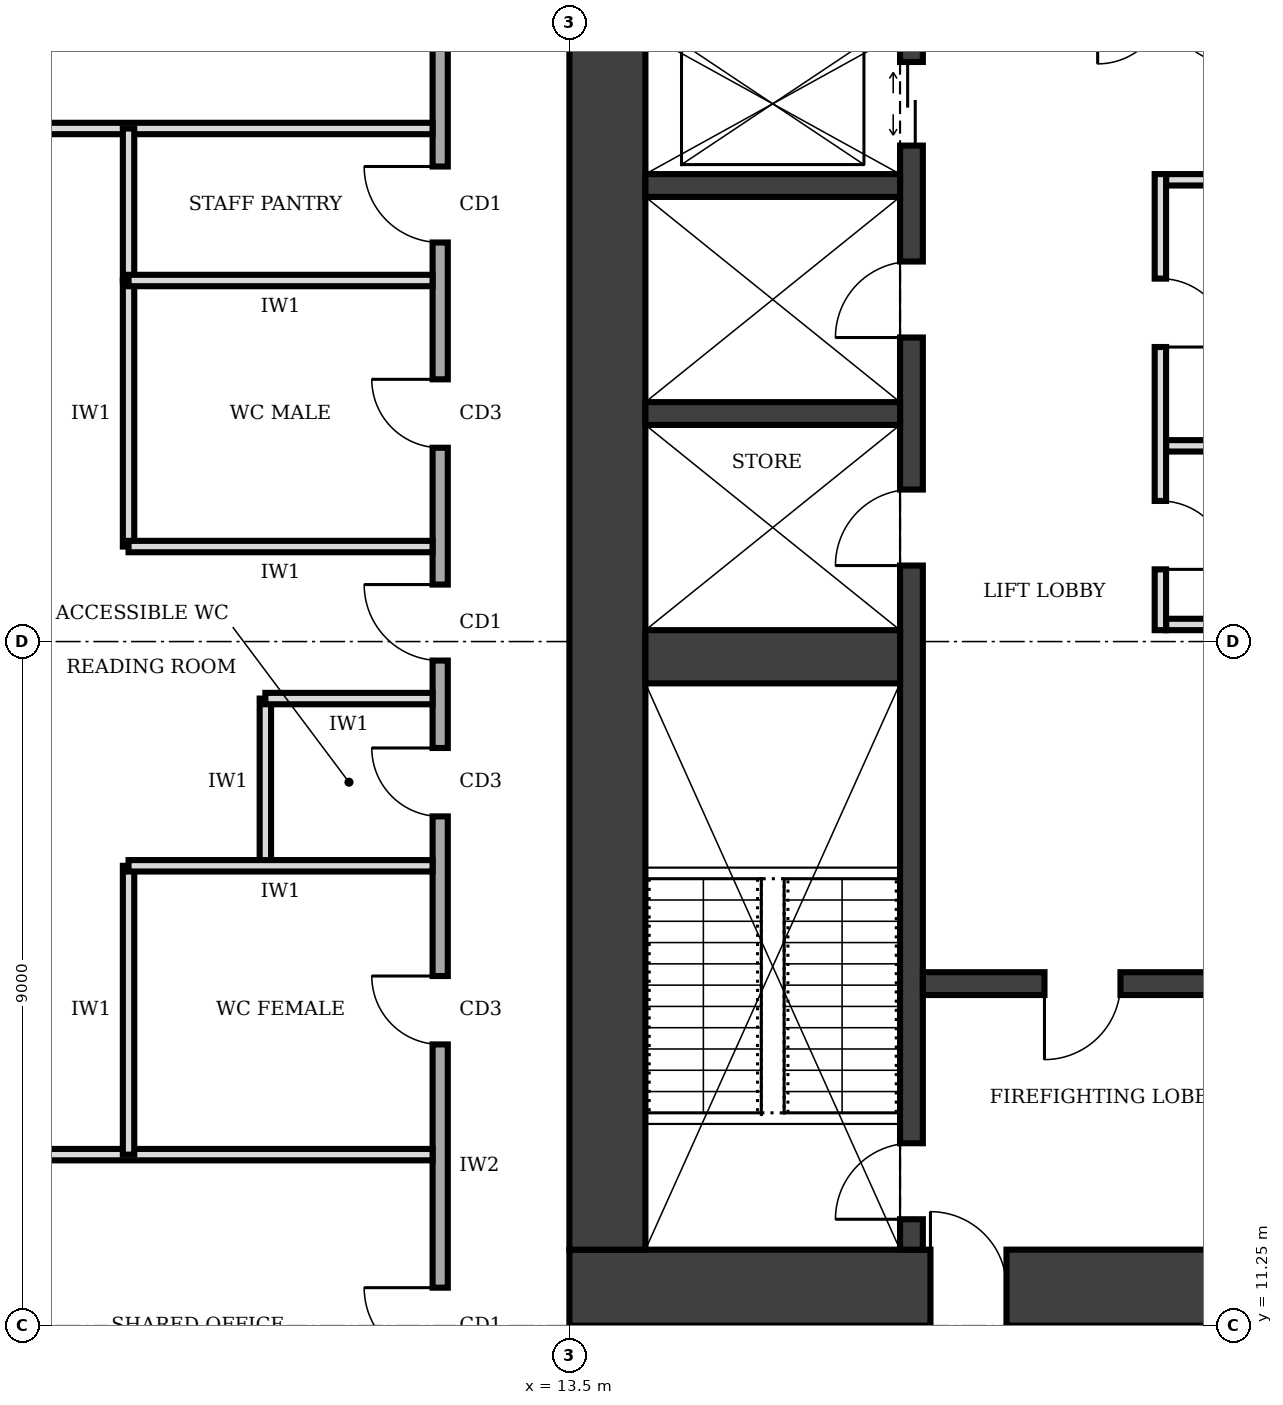
"""IFC4 building model, lengths in metres.
Left out: names, types, materials, properties, quantities, classifications, styles, units other than length and angle.
Written with IfcOpenShell. Run it as: python <this file> out.ifc"""

import sys

from ifc_helpers import new_model, si_unit, direction, frame, frame_2d, origin, place, context, subcontext, project, spatial, rectangle, extrude, element, fill, save


model = new_model("IFC4")
c1 = context("Model", 3, precision=1e-05, world=origin(), true_north=direction((0.0, 1.0)))
c2 = subcontext(c1, "Body", "Model", "MODEL_VIEW")
j1 = project(units=[si_unit("LENGTHUNIT", "METRE"), si_unit("PLANEANGLEUNIT", "RADIAN")], contexts=[c1])
p1 = place(None, origin())
s1 = spatial("IfcSite", under=j1, at=p1, CompositionType="ELEMENT")
p2 = place(p1, origin())
s2 = spatial("IfcBuilding", under=s1, at=p2, CompositionType="ELEMENT")
p3 = place(p2, frame((0.0, 0.0, 201.0)))
s3 = spatial("IfcBuildingStorey", under=s2, at=p3, CompositionType="ELEMENT", Elevation=201.0)
p4 = place(p3, frame((13.5, 11.75, 0.0), z_axis=(0.0, 0.0, 1.0), x_axis=(1.0, 0.0, 0.0)))
e1 = element("IfcWall", 1, at=p4, inside=s3, PredefinedType="SHEAR", context=c2, shape_type="SweptSolid", body=[
    extrude(rectangle(XDim=13.5, YDim=1.0, at=frame_2d((6.75, 0.0))), origin(), (0.0, 0.0, 1.0), 4.0),
])
p5 = place(p4, frame((4.75, 0.0, 0.0)))
e2 = element("IfcOpeningElement", 2, at=p5, cuts=e1, PredefinedType="OPENING", context=c2, shape_type="SweptSolid", body=[
    extrude(rectangle(XDim=1.0, YDim=2.1, at=frame_2d((0.5, 1.05))), frame((0.0, 0.51, 0.0), z_axis=(0.0, -1.0, 0.0), x_axis=(1.0, 0.0, 0.0)), (0.0, 0.0, 1.0), 1.02),
])
p6 = place(p3, frame((14.0, 28.25, 0.0), z_axis=(0.0, 0.0, 1.0), x_axis=(0.0, -1.0, 0.0)))
e3 = element("IfcWall", 3, at=p6, inside=s3, PredefinedType="SHEAR", context=c2, shape_type="SweptSolid", body=[
    extrude(rectangle(XDim=16.0, YDim=1.0, at=frame_2d((8.0, 0.0))), origin(), (0.0, 0.0, 1.0), 4.0),
])
p7 = place(p3, frame((18.0, 12.25, 0.0), z_axis=(0.0, 0.0, 1.0), x_axis=(0.0, 1.0, 0.0)))
e4 = element("IfcWall", 4, at=p7, inside=s3, PredefinedType="SHEAR", context=c2, shape_type="SweptSolid", body=[
    extrude(rectangle(XDim=16.0, YDim=0.3, at=frame_2d((8.0, 0.0))), origin(), (0.0, 0.0, 1.0), 4.0),
])
p8 = place(p7, frame((0.4, 0.0, 0.0)))
e5 = element("IfcOpeningElement", 5, at=p8, cuts=e4, PredefinedType="OPENING", context=c2, shape_type="SweptSolid", body=[
    extrude(rectangle(XDim=1.0, YDim=2.1, at=frame_2d((0.5, 1.05))), frame((0.0, 0.16, 0.0), z_axis=(0.0, -1.0, 0.0), x_axis=(1.0, 0.0, 0.0)), (0.0, 0.0, 1.0), 0.32),
])
p9 = place(p7, frame((14.525, 0.0, 0.0)))
e6 = element("IfcOpeningElement", 6, at=p9, cuts=e4, PredefinedType="OPENING", context=c2, shape_type="SweptSolid", body=[
    extrude(rectangle(XDim=1.1, YDim=2.1, at=frame_2d((0.55, 1.05))), frame((0.0, 0.16, 0.0), z_axis=(0.0, -1.0, 0.0), x_axis=(1.0, 0.0, 0.0)), (0.0, 0.0, 1.0), 0.32),
])
p10 = place(p7, frame((9.0, 0.0, 0.0)))
e7 = element("IfcOpeningElement", 7, at=p10, cuts=e4, PredefinedType="OPENING", context=c2, shape_type="SweptSolid", body=[
    extrude(rectangle(XDim=1.0, YDim=2.1, at=frame_2d((0.5, 1.05))), frame((0.0, 0.16, 0.0), z_axis=(0.0, -1.0, 0.0), x_axis=(1.0, 0.0, 0.0)), (0.0, 0.0, 1.0), 0.32),
])
p11 = place(p7, frame((12.0, 0.0, 0.0)))
e8 = element("IfcOpeningElement", 8, at=p11, cuts=e4, PredefinedType="OPENING", context=c2, shape_type="SweptSolid", body=[
    extrude(rectangle(XDim=1.0, YDim=2.1, at=frame_2d((0.5, 1.05))), frame((0.0, 0.16, 0.0), z_axis=(0.0, -1.0, 0.0), x_axis=(1.0, 0.0, 0.0)), (0.0, 0.0, 1.0), 0.32),
])
p12 = place(p3, frame((14.5, 20.05, 0.0), z_axis=(0.0, 0.0, 1.0), x_axis=(1.0, 0.0, 0.0)))
e9 = element("IfcWall", 9, at=p12, inside=s3, PredefinedType="SHEAR", context=c2, shape_type="SweptSolid", body=[
    extrude(rectangle(XDim=3.35, YDim=0.7, at=frame_2d((1.675, 0.0))), origin(), (0.0, 0.0, 1.0), 4.0),
])
p13 = place(p3, frame((18.15, 15.75, 0.0), z_axis=(0.0, 0.0, 1.0), x_axis=(1.0, 0.0, 0.0)))
e10 = element("IfcWall", 10, at=p13, inside=s3, PredefinedType="SHEAR", context=c2, shape_type="SweptSolid", body=[
    extrude(rectangle(XDim=4.2, YDim=0.3, at=frame_2d((2.1, 0.0))), origin(), (0.0, 0.0, 1.0), 4.0),
])
p14 = place(p13, frame((1.6, 0.0, 0.0)))
e11 = element("IfcOpeningElement", 11, at=p14, cuts=e10, PredefinedType="OPENING", context=c2, shape_type="SweptSolid", body=[
    extrude(rectangle(XDim=1.0, YDim=2.1, at=frame_2d((0.5, 1.05))), frame((0.0, 0.16, 0.0), z_axis=(0.0, -1.0, 0.0), x_axis=(1.0, 0.0, 0.0)), (0.0, 0.0, 1.0), 0.32),
])
for number, where, z_axis, x_axis in (
    (12, (14.5, 23.25, 0.0), (0.0, 0.0, 1.0), (1.0, 0.0, 0.0)),
    (13, (14.5, 26.25, 0.0), (0.0, 0.0, 1.0), (1.0, 0.0, 0.0)),
):
    element("IfcWall", number, at=place(p3, frame(where, z_axis=z_axis, x_axis=x_axis)), inside=s3, PredefinedType="SHEAR", context=c2, shape_type="SweptSolid", body=[
        extrude(rectangle(XDim=3.35, YDim=0.3, at=frame_2d((1.675, 0.0))), origin(), (0.0, 0.0, 1.0), 4.0),
    ])
p15 = place(p3, frame((21.275, 20.4, 0.0), z_axis=(0.0, 0.0, 1.0), x_axis=(0.0, 1.0, 0.0)))
e14 = element("IfcWall", 14, at=p15, inside=s3, PredefinedType="PARTITIONING", context=c2, shape_type="SweptSolid", body=[
    extrude(rectangle(XDim=6.0, YDim=0.15, at=frame_2d((3.0, 0.0))), origin(), (0.0, 0.0, 1.0), 3.75),
])
p16 = place(p15, frame((0.8, 0.0, 0.0)))
e15 = element("IfcOpeningElement", 15, at=p16, cuts=e14, PredefinedType="OPENING", context=c2, shape_type="SweptSolid", body=[
    extrude(rectangle(XDim=0.9, YDim=2.1, at=frame_2d((0.45, 1.05))), frame((0.0, 0.085, 0.0), z_axis=(0.0, -1.0, 0.0), x_axis=(1.0, 0.0, 0.0)), (0.0, 0.0, 1.0), 0.17),
])
p17 = place(p15, frame((3.725, 0.0, 0.0)))
e16 = element("IfcOpeningElement", 16, at=p17, cuts=e14, PredefinedType="OPENING", context=c2, shape_type="SweptSolid", body=[
    extrude(rectangle(XDim=0.9, YDim=2.1, at=frame_2d((0.45, 1.05))), frame((0.0, 0.085, 0.0), z_axis=(0.0, -1.0, 0.0), x_axis=(1.0, 0.0, 0.0)), (0.0, 0.0, 1.0), 0.17),
])
for number, where, z_axis, x_axis in (
    (17, (21.35, 20.475, 0.0), (0.0, 0.0, 1.0), (1.0, 0.0, 0.0)),
    (18, (21.35, 22.825, 0.0), (0.0, 0.0, 1.0), (1.0, 0.0, 0.0)),
    (19, (21.35, 26.325, 0.0), (0.0, 0.0, 1.0), (1.0, 0.0, 0.0)),
):
    element("IfcWall", number, at=place(p3, frame(where, z_axis=z_axis, x_axis=x_axis)), inside=s3, PredefinedType="PARTITIONING", context=c2, shape_type="SweptSolid", body=[
        extrude(rectangle(XDim=1.0, YDim=0.15, at=frame_2d((0.5, 0.0))), origin(), (0.0, 0.0, 1.0), 3.75),
    ])
p18 = place(p3, frame((11.8, 32.8, 0.0), z_axis=(0.0, 0.0, 1.0), x_axis=(0.0, -1.0, 0.0)))
e20 = element("IfcWall", 20, at=p18, inside=s3, PredefinedType="SOLIDWALL", context=c2, shape_type="SweptSolid", body=[
    extrude(rectangle(XDim=23.8, YDim=0.2, at=frame_2d((11.9, 0.0))), origin(), (0.0, 0.0, 1.0), 3.75),
])
p19 = place(p18, frame((21.05, 0.0, 0.0)))
e21 = element("IfcOpeningElement", 21, at=p19, cuts=e20, PredefinedType="OPENING", context=c2, shape_type="SweptSolid", body=[
    extrude(rectangle(XDim=1.0, YDim=2.1, at=frame_2d((0.5, 1.05))), frame((0.0, 0.11, 0.0), z_axis=(0.0, -1.0, 0.0), x_axis=(1.0, 0.0, 0.0)), (0.0, 0.0, 1.0), 0.22),
])
p20 = place(p18, frame((16.95, 0.0, 0.0)))
e22 = element("IfcOpeningElement", 22, at=p20, cuts=e20, PredefinedType="OPENING", context=c2, shape_type="SweptSolid", body=[
    extrude(rectangle(XDim=0.9, YDim=2.1, at=frame_2d((0.45, 1.05))), frame((0.0, 0.11, 0.0), z_axis=(0.0, -1.0, 0.0), x_axis=(1.0, 0.0, 0.0)), (0.0, 0.0, 1.0), 0.22),
])
p21 = place(p18, frame((13.95, 0.0, 0.0)))
e23 = element("IfcOpeningElement", 23, at=p21, cuts=e20, PredefinedType="OPENING", context=c2, shape_type="SweptSolid", body=[
    extrude(rectangle(XDim=0.9, YDim=2.1, at=frame_2d((0.45, 1.05))), frame((0.0, 0.11, 0.0), z_axis=(0.0, -1.0, 0.0), x_axis=(1.0, 0.0, 0.0)), (0.0, 0.0, 1.0), 0.22),
])
p22 = place(p18, frame((9.1, 0.0, 0.0)))
e24 = element("IfcOpeningElement", 24, at=p22, cuts=e20, PredefinedType="OPENING", context=c2, shape_type="SweptSolid", body=[
    extrude(rectangle(XDim=0.9, YDim=2.1, at=frame_2d((0.45, 1.05))), frame((0.0, 0.11, 0.0), z_axis=(0.0, -1.0, 0.0), x_axis=(1.0, 0.0, 0.0)), (0.0, 0.0, 1.0), 0.22),
])
p23 = place(p18, frame((6.3, 0.0, 0.0)))
e25 = element("IfcOpeningElement", 25, at=p23, cuts=e20, PredefinedType="OPENING", context=c2, shape_type="SweptSolid", body=[
    extrude(rectangle(XDim=1.0, YDim=2.1, at=frame_2d((0.5, 1.05))), frame((0.0, 0.11, 0.0), z_axis=(0.0, -1.0, 0.0), x_axis=(1.0, 0.0, 0.0)), (0.0, 0.0, 1.0), 0.22),
])
p24 = place(p18, frame((11.8, 0.0, 0.0)))
e26 = element("IfcOpeningElement", 26, at=p24, cuts=e20, PredefinedType="OPENING", context=c2, shape_type="SweptSolid", body=[
    extrude(rectangle(XDim=1.0, YDim=2.1, at=frame_2d((0.5, 1.05))), frame((0.0, 0.11, 0.0), z_axis=(0.0, -1.0, 0.0), x_axis=(1.0, 0.0, 0.0)), (0.0, 0.0, 1.0), 0.22),
])
p25 = place(p18, frame((2.3, 0.0, 0.0)))
e27 = element("IfcOpeningElement", 27, at=p25, cuts=e20, PredefinedType="OPENING", context=c2, shape_type="SweptSolid", body=[
    extrude(rectangle(XDim=1.0, YDim=2.1, at=frame_2d((0.5, 1.05))), frame((0.0, 0.11, 0.0), z_axis=(0.0, -1.0, 0.0), x_axis=(1.0, 0.0, 0.0)), (0.0, 0.0, 1.0), 0.22),
])
for number, where, z_axis, x_axis in (
    (28, (0.3, 13.5, 0.0), (0.0, 0.0, 1.0), (1.0, 0.0, 0.0)),
    (29, (0.3, 27.0, 0.0), (0.0, 0.0, 1.0), (1.0, 0.0, 0.0)),
):
    element("IfcWall", number, at=place(p3, frame(where, z_axis=z_axis, x_axis=x_axis)), inside=s3, PredefinedType="PARTITIONING", context=c2, shape_type="SweptSolid", body=[
        extrude(rectangle(XDim=11.4, YDim=0.15, at=frame_2d((5.7, 0.0))), origin(), (0.0, 0.0, 1.0), 3.75),
    ])
p26 = place(p3, frame((11.7, 17.3, 0.0), z_axis=(0.0, 0.0, 1.0), x_axis=(-1.0, 0.0, 0.0)))
e30 = element("IfcWall", 30, at=p26, inside=s3, PredefinedType="PARTITIONING", context=c2, shape_type="SweptSolid", body=[
    extrude(rectangle(XDim=4.0, YDim=0.15, at=frame_2d((2.0, 0.0))), origin(), (0.0, 0.0, 1.0), 3.75),
])
p27 = place(p3, frame((11.7, 19.5, 0.0), z_axis=(0.0, 0.0, 1.0), x_axis=(-1.0, 0.0, 0.0)))
e31 = element("IfcWall", 31, at=p27, inside=s3, PredefinedType="PARTITIONING", context=c2, shape_type="SweptSolid", body=[
    extrude(rectangle(XDim=2.2, YDim=0.15, at=frame_2d((1.1, 0.0))), origin(), (0.0, 0.0, 1.0), 2.85),
])
for number, where, z_axis, x_axis in (
    (32, (11.7, 21.5, 0.0), (0.0, 0.0, 1.0), (-1.0, 0.0, 0.0)),
    (33, (11.7, 25.0, 0.0), (0.0, 0.0, 1.0), (-1.0, 0.0, 0.0)),
):
    element("IfcWall", number, at=place(p3, frame(where, z_axis=z_axis, x_axis=x_axis)), inside=s3, PredefinedType="PARTITIONING", context=c2, shape_type="SweptSolid", body=[
        extrude(rectangle(XDim=4.0, YDim=0.15, at=frame_2d((2.0, 0.0))), origin(), (0.0, 0.0, 1.0), 3.75),
    ])
p28 = place(p3, frame((7.7, 13.5, 0.0), z_axis=(0.0, 0.0, 1.0), x_axis=(0.0, 1.0, 0.0)))
e34 = element("IfcWall", 34, at=p28, inside=s3, PredefinedType="PARTITIONING", context=c2, shape_type="SweptSolid", body=[
    extrude(rectangle(XDim=3.8, YDim=0.15, at=frame_2d((1.9, 0.0))), origin(), (0.0, 0.0, 1.0), 3.75),
])
p29 = place(p3, frame((9.5, 17.3, 0.0), z_axis=(0.0, 0.0, 1.0), x_axis=(0.0, 1.0, 0.0)))
e35 = element("IfcWall", 35, at=p29, inside=s3, PredefinedType="PARTITIONING", context=c2, shape_type="SweptSolid", body=[
    extrude(rectangle(XDim=2.2, YDim=0.15, at=frame_2d((1.1, 0.0))), origin(), (0.0, 0.0, 1.0), 3.75),
])
p30 = place(p3, frame((7.7, 21.5, 0.0), z_axis=(0.0, 0.0, 1.0), x_axis=(0.0, 1.0, 0.0)))
e36 = element("IfcWall", 36, at=p30, inside=s3, PredefinedType="PARTITIONING", context=c2, shape_type="SweptSolid", body=[
    extrude(rectangle(XDim=3.5, YDim=0.15, at=frame_2d((1.75, 0.0))), origin(), (0.0, 0.0, 1.0), 3.75),
])
p31 = place(p3, frame((7.7, 25.0, 0.0), z_axis=(0.0, 0.0, 1.0), x_axis=(0.0, 1.0, 0.0)))
e37 = element("IfcWall", 37, at=p31, inside=s3, PredefinedType="PARTITIONING", context=c2, shape_type="SweptSolid", body=[
    extrude(rectangle(XDim=2.0, YDim=0.15, at=frame_2d((1.0, 0.0))), origin(), (0.0, 0.0, 1.0), 3.75),
])
p32 = place(p5, origin())
e38 = element("IfcDoor", 38, at=p32, inside=s3, OperationType="SINGLE_SWING_LEFT", PredefinedType="DOOR", context=c2, shape_type="SweptSolid", body=[
    extrude(rectangle(XDim=1.0, YDim=2.1, at=frame_2d((0.5, 1.05))), frame((0.0, 0.025, 0.0), z_axis=(0.0, -1.0, 0.0), x_axis=(1.0, 0.0, 0.0)), (0.0, 0.0, 1.0), 0.05),
])
fill(e2, e38)
p33 = place(p14, frame((1.0, 0.0, 0.0), z_axis=(0.0, 0.0, 1.0), x_axis=(-1.0, 0.0, 0.0)))
e39 = element("IfcDoor", 39, at=p33, inside=s3, OperationType="SINGLE_SWING_RIGHT", PredefinedType="DOOR", context=c2, shape_type="SweptSolid", body=[
    extrude(rectangle(XDim=1.0, YDim=2.1, at=frame_2d((0.5, 1.05))), frame((0.0, 0.025, 0.0), z_axis=(0.0, -1.0, 0.0), x_axis=(1.0, 0.0, 0.0)), (0.0, 0.0, 1.0), 0.05),
])
fill(e11, e39)
p34 = place(p8, origin())
e40 = element("IfcDoor", 40, at=p34, inside=s3, OperationType="SINGLE_SWING_LEFT", PredefinedType="DOOR", context=c2, shape_type="SweptSolid", body=[
    extrude(rectangle(XDim=1.0, YDim=2.1, at=frame_2d((0.5, 1.05))), frame((0.0, 0.025, 0.0), z_axis=(0.0, -1.0, 0.0), x_axis=(1.0, 0.0, 0.0)), (0.0, 0.0, 1.0), 0.05),
])
fill(e5, e40)
p35 = place(p9, origin())
e41 = element("IfcDoor", 41, at=p35, inside=s3, OperationType="DOUBLE_DOOR_SLIDING", PredefinedType="DOOR", context=c2, shape_type="SweptSolid", body=[
    extrude(rectangle(XDim=1.1, YDim=2.1, at=frame_2d((0.55, 1.05))), frame((0.0, 0.025, 0.0), z_axis=(0.0, -1.0, 0.0), x_axis=(1.0, 0.0, 0.0)), (0.0, 0.0, 1.0), 0.05),
])
fill(e6, e41)
p36 = place(p16, frame((0.9, 0.0, 0.0), z_axis=(0.0, 0.0, 1.0), x_axis=(-1.0, 0.0, 0.0)))
e42 = element("IfcDoor", 42, at=p36, inside=s3, OperationType="SINGLE_SWING_RIGHT", PredefinedType="DOOR", context=c2, shape_type="SweptSolid", body=[
    extrude(rectangle(XDim=0.9, YDim=2.1, at=frame_2d((0.45, 1.05))), frame((0.0, 0.025, 0.0), z_axis=(0.0, -1.0, 0.0), x_axis=(1.0, 0.0, 0.0)), (0.0, 0.0, 1.0), 0.05),
])
fill(e15, e42)
p37 = place(p17, frame((0.9, 0.0, 0.0), z_axis=(0.0, 0.0, 1.0), x_axis=(-1.0, 0.0, 0.0)))
e43 = element("IfcDoor", 43, at=p37, inside=s3, OperationType="SINGLE_SWING_RIGHT", PredefinedType="DOOR", context=c2, shape_type="SweptSolid", body=[
    extrude(rectangle(XDim=0.9, YDim=2.1, at=frame_2d((0.45, 1.05))), frame((0.0, 0.025, 0.0), z_axis=(0.0, -1.0, 0.0), x_axis=(1.0, 0.0, 0.0)), (0.0, 0.0, 1.0), 0.05),
])
fill(e16, e43)
p38 = place(p10, origin())
e44 = element("IfcDoor", 44, at=p38, inside=s3, OperationType="SINGLE_SWING_LEFT", PredefinedType="DOOR", context=c2, shape_type="SweptSolid", body=[
    extrude(rectangle(XDim=1.0, YDim=2.1, at=frame_2d((0.5, 1.05))), frame((0.0, 0.025, 0.0), z_axis=(0.0, -1.0, 0.0), x_axis=(1.0, 0.0, 0.0)), (0.0, 0.0, 1.0), 0.05),
])
fill(e7, e44)
p39 = place(p11, origin())
e45 = element("IfcDoor", 45, at=p39, inside=s3, OperationType="SINGLE_SWING_LEFT", PredefinedType="DOOR", context=c2, shape_type="SweptSolid", body=[
    extrude(rectangle(XDim=1.0, YDim=2.1, at=frame_2d((0.5, 1.05))), frame((0.0, 0.025, 0.0), z_axis=(0.0, -1.0, 0.0), x_axis=(1.0, 0.0, 0.0)), (0.0, 0.0, 1.0), 0.05),
])
fill(e8, e45)
p40 = place(p19, frame((1.0, 0.0, 0.0), z_axis=(0.0, 0.0, 1.0), x_axis=(-1.0, 0.0, 0.0)))
e46 = element("IfcDoor", 46, at=p40, inside=s3, OperationType="SINGLE_SWING_RIGHT", PredefinedType="DOOR", context=c2, shape_type="SweptSolid", body=[
    extrude(rectangle(XDim=1.0, YDim=2.1, at=frame_2d((0.5, 1.05))), frame((0.0, 0.025, 0.0), z_axis=(0.0, -1.0, 0.0), x_axis=(1.0, 0.0, 0.0)), (0.0, 0.0, 1.0), 0.05),
])
fill(e21, e46)
p41 = place(p20, frame((0.9, 0.0, 0.0), z_axis=(0.0, 0.0, 1.0), x_axis=(-1.0, 0.0, 0.0)))
e47 = element("IfcDoor", 47, at=p41, inside=s3, OperationType="SINGLE_SWING_RIGHT", PredefinedType="DOOR", context=c2, shape_type="SweptSolid", body=[
    extrude(rectangle(XDim=0.9, YDim=2.1, at=frame_2d((0.45, 1.05))), frame((0.0, 0.025, 0.0), z_axis=(0.0, -1.0, 0.0), x_axis=(1.0, 0.0, 0.0)), (0.0, 0.0, 1.0), 0.05),
])
fill(e22, e47)
p42 = place(p21, frame((0.9, 0.0, 0.0), z_axis=(0.0, 0.0, 1.0), x_axis=(-1.0, 0.0, 0.0)))
e48 = element("IfcDoor", 48, at=p42, inside=s3, OperationType="SINGLE_SWING_RIGHT", PredefinedType="DOOR", context=c2, shape_type="SweptSolid", body=[
    extrude(rectangle(XDim=0.9, YDim=2.1, at=frame_2d((0.45, 1.05))), frame((0.0, 0.025, 0.0), z_axis=(0.0, -1.0, 0.0), x_axis=(1.0, 0.0, 0.0)), (0.0, 0.0, 1.0), 0.05),
])
fill(e23, e48)
p43 = place(p22, frame((0.9, 0.0, 0.0), z_axis=(0.0, 0.0, 1.0), x_axis=(-1.0, 0.0, 0.0)))
e49 = element("IfcDoor", 49, at=p43, inside=s3, OperationType="SINGLE_SWING_RIGHT", PredefinedType="DOOR", context=c2, shape_type="SweptSolid", body=[
    extrude(rectangle(XDim=0.9, YDim=2.1, at=frame_2d((0.45, 1.05))), frame((0.0, 0.025, 0.0), z_axis=(0.0, -1.0, 0.0), x_axis=(1.0, 0.0, 0.0)), (0.0, 0.0, 1.0), 0.05),
])
fill(e24, e49)
p44 = place(p23, frame((1.0, 0.0, 0.0), z_axis=(0.0, 0.0, 1.0), x_axis=(-1.0, 0.0, 0.0)))
e50 = element("IfcDoor", 50, at=p44, inside=s3, OperationType="SINGLE_SWING_RIGHT", PredefinedType="DOOR", context=c2, shape_type="SweptSolid", body=[
    extrude(rectangle(XDim=1.0, YDim=2.1, at=frame_2d((0.5, 1.05))), frame((0.0, 0.025, 0.0), z_axis=(0.0, -1.0, 0.0), x_axis=(1.0, 0.0, 0.0)), (0.0, 0.0, 1.0), 0.05),
])
fill(e25, e50)
p45 = place(p24, frame((1.0, 0.0, 0.0), z_axis=(0.0, 0.0, 1.0), x_axis=(-1.0, 0.0, 0.0)))
e51 = element("IfcDoor", 51, at=p45, inside=s3, OperationType="SINGLE_SWING_RIGHT", PredefinedType="DOOR", context=c2, shape_type="SweptSolid", body=[
    extrude(rectangle(XDim=1.0, YDim=2.1, at=frame_2d((0.5, 1.05))), frame((0.0, 0.025, 0.0), z_axis=(0.0, -1.0, 0.0), x_axis=(1.0, 0.0, 0.0)), (0.0, 0.0, 1.0), 0.05),
])
fill(e26, e51)
save(model, sys.argv[1])
